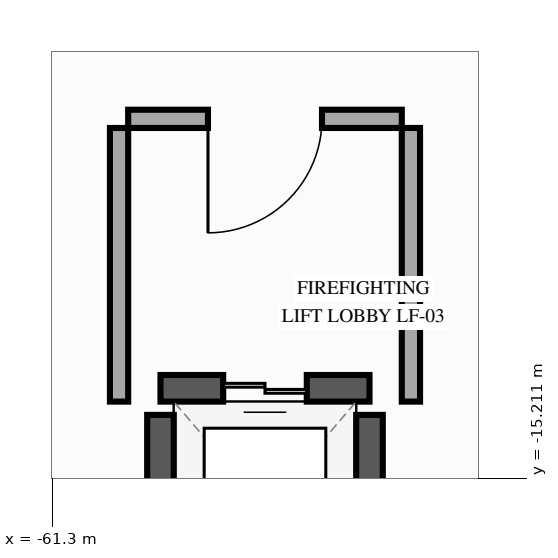
"""IFC4 building model, lengths in metres.
Left out: names, types, materials, properties, quantities, classifications, styles, units other than length and angle.
Written with IfcOpenShell. Run it as: python <this file> out.ifc"""

import sys

from ifc_helpers import new_model, si_unit, direction, frame, frame_2d, origin, place, context, subcontext, project, spatial, rectangle, extrude, element, fill, save


model = new_model("IFC4")
c1 = context("Model", 3, precision=1e-05, world=origin(), true_north=direction((0.0, 1.0)))
c2 = subcontext(c1, "Body", "Model", "MODEL_VIEW")
j1 = project(units=[si_unit("LENGTHUNIT", "METRE"), si_unit("PLANEANGLEUNIT", "RADIAN")], contexts=[c1])
p1 = place(None, origin())
s1 = spatial("IfcSite", under=j1, at=p1, CompositionType="ELEMENT")
p2 = place(p1, origin())
s2 = spatial("IfcBuilding", under=s1, at=p2, CompositionType="ELEMENT")
p3 = place(p2, frame((0.0, 0.0, 21.6)))
s3 = spatial("IfcBuildingStorey", under=s2, at=p3, CompositionType="ELEMENT", Elevation=21.6)
p4 = place(p3, frame((-57.125, -14.025, 0.0), z_axis=(0.0, 0.0, 1.0), x_axis=(-1.0, 0.0, 0.0)))
e1 = element("IfcWall", 1, at=p4, inside=s3, PredefinedType="SHEAR", context=c2, shape_type="SweptSolid", body=[
    extrude(rectangle(XDim=2.75, YDim=0.35, at=frame_2d((1.375, 0.0))), origin(), (0.0, 0.0, 1.0), 5.15),
])
p5 = place(p4, frame((0.825, 0.0, 0.0)))
e2 = element("IfcOpeningElement", 2, at=p5, cuts=e1, PredefinedType="OPENING", context=c2, shape_type="SweptSolid", body=[
    extrude(rectangle(XDim=1.1, YDim=2.2, at=frame_2d((0.55, 1.1))), frame((0.0, 0.185, 0.0), z_axis=(0.0, -1.0, 0.0), x_axis=(1.0, 0.0, 0.0)), (0.0, 0.0, 1.0), 0.37),
])
for number, where, z_axis, x_axis in (
    (3, (-59.875, -16.825, 0.0), (0.0, 0.0, 1.0), (0.0, 1.0, 0.0)),
    (4, (-57.125, -16.825, 0.0), (0.0, 0.0, 1.0), (0.0, 1.0, 0.0)),
):
    element("IfcWall", number, at=place(p3, frame(where, z_axis=z_axis, x_axis=x_axis)), inside=s3, PredefinedType="SHEAR", context=c2, shape_type="SweptSolid", body=[
        extrude(rectangle(XDim=2.45, YDim=0.35, at=frame_2d((1.225, 0.0))), origin(), (0.0, 0.0, 1.0), 5.15),
    ])
p6 = place(p3, frame((-56.7, -10.48, 0.0), z_axis=(0.0, 0.0, 1.0), x_axis=(-1.0, 0.0, 0.0)))
e5 = element("IfcWall", 5, at=p6, inside=s3, PredefinedType="PARTITIONING", context=c2, shape_type="SweptSolid", body=[
    extrude(rectangle(XDim=3.6, YDim=0.24, at=frame_2d((1.8, 0.0))), origin(), (0.0, 0.0, 1.0), 5.1),
])
p7 = place(p6, frame((1.05, 0.0, 0.0)))
e6 = element("IfcOpeningElement", 6, at=p7, cuts=e5, PredefinedType="OPENING", context=c2, shape_type="SweptSolid", body=[
    extrude(rectangle(XDim=1.5, YDim=2.2, at=frame_2d((0.75, 1.1))), frame((0.0, 0.13, 0.0), z_axis=(0.0, -1.0, 0.0), x_axis=(1.0, 0.0, 0.0)), (0.0, 0.0, 1.0), 0.26),
])
for number, where, z_axis, x_axis in (
    (7, (-60.42, -14.2, 0.0), (0.0, 0.0, 1.0), (0.0, 1.0, 0.0)),
    (8, (-56.58, -14.2, 0.0), (0.0, 0.0, 1.0), (0.0, 1.0, 0.0)),
):
    element("IfcWall", number, at=place(p3, frame(where, z_axis=z_axis, x_axis=x_axis)), inside=s3, PredefinedType="PARTITIONING", context=c2, shape_type="SweptSolid", body=[
        extrude(rectangle(XDim=3.6, YDim=0.24, at=frame_2d((1.8, 0.0))), origin(), (0.0, 0.0, 1.0), 4.835),
    ])
p8 = place(p5, origin())
e9 = element("IfcDoor", 9, at=p8, inside=s3, OperationType="DOUBLE_DOOR_SLIDING", PredefinedType="DOOR", context=c2, shape_type="SweptSolid", body=[
    extrude(rectangle(XDim=1.1, YDim=2.2, at=frame_2d((0.55, 1.1))), frame((0.0, 0.025, 0.0), z_axis=(0.0, -1.0, 0.0), x_axis=(1.0, 0.0, 0.0)), (0.0, 0.0, 1.0), 0.05),
])
fill(e2, e9)
p9 = place(p7, origin())
e10 = element("IfcDoor", 10, at=p9, inside=s3, OperationType="SINGLE_SWING_RIGHT", PredefinedType="DOOR", context=c2, shape_type="SweptSolid", body=[
    extrude(rectangle(XDim=1.5, YDim=2.2, at=frame_2d((0.75, 1.1))), frame((0.0, 0.025, 0.0), z_axis=(0.0, -1.0, 0.0), x_axis=(1.0, 0.0, 0.0)), (0.0, 0.0, 1.0), 0.05),
])
fill(e6, e10)
save(model, sys.argv[1])
